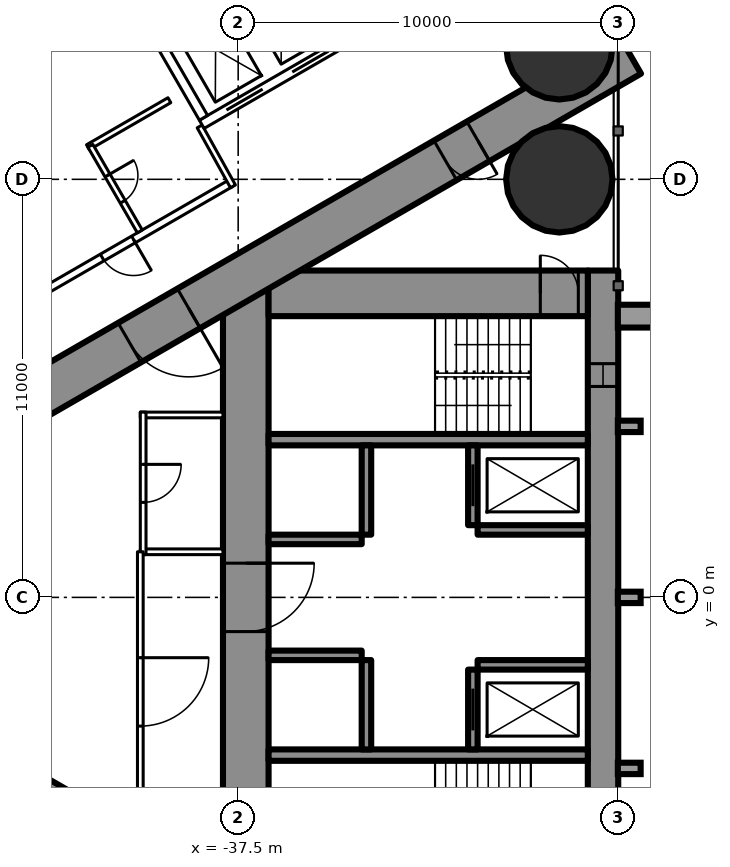
"""IFC4 building model, lengths in metres.
Left out: names, types, materials, properties, quantities, classifications, styles, units other than length and angle.
Written with IfcOpenShell. Run it as: python <this file> out.ifc"""

import sys

from ifc_helpers import new_model, si_unit, direction, frame, frame_2d, origin, origin_2d, place, context, subcontext, project, spatial, rectangle, hollow_circle, extrude, element, fill, save


model = new_model("IFC4")
c1 = context("Model", 3, precision=1e-05, world=origin(), true_north=direction((0.0, 1.0)))
c2 = subcontext(c1, "Body", "Model", "MODEL_VIEW")
j1 = project(units=[si_unit("LENGTHUNIT", "METRE"), si_unit("PLANEANGLEUNIT", "RADIAN")], contexts=[c1])
p1 = place(None, origin())
s1 = spatial("IfcSite", under=j1, at=p1, CompositionType="ELEMENT")
p2 = place(p1, origin())
s2 = spatial("IfcBuilding", under=s1, at=p2, CompositionType="ELEMENT")
p3 = place(p2, frame((0.0, 0.0, 42.5)))
s3 = spatial("IfcBuildingStorey", under=s2, at=p3, CompositionType="ELEMENT", Elevation=42.5)
for number, where, z_axis, x_axis in (
    (1, (-29.05, 11.0, 0.0), (0.0, 0.0, 1.0), (1.0, 0.0, 0.0)),
    (2, (-29.05, 14.5, 0.0), (0.0, 0.0, 1.0), (1.0, 0.0, 0.0)),
):
    element("IfcColumn", number, at=place(p3, frame(where, z_axis=z_axis, x_axis=x_axis)), inside=s3, PredefinedType="COLUMN", context=c2, shape_type="SweptSolid", body=[
        extrude(hollow_circle(Radius=1.4, WallThickness=0.12, at=origin_2d()), origin(), (0.0, 0.0, 1.0), 3.5),
    ])
p4 = place(p3, frame((-27.9, 8.6, 0.0), z_axis=(0.0, 0.0, 1.0), x_axis=(0.0, -1.0, 0.0)))
e3 = element("IfcWall", 3, at=p4, inside=s3, PredefinedType="SHEAR", context=c2, shape_type="SweptSolid", body=[
    extrude(rectangle(XDim=17.2, YDim=0.8, at=frame_2d((8.6, 0.0))), origin(), (0.0, 0.0, 1.0), 3.5),
])
p5 = place(p4, frame((2.45, 0.0, 0.6)))
e4 = element("IfcOpeningElement", 4, at=p5, cuts=e3, PredefinedType="OPENING", context=c2, shape_type="SweptSolid", body=[
    extrude(rectangle(XDim=0.6, YDim=2.1, at=frame_2d((0.3, 1.05))), frame((0.0, 0.41, 0.0), z_axis=(0.0, -1.0, 0.0), x_axis=(1.0, 0.0, 0.0)), (0.0, 0.0, 1.0), 0.82),
])
p6 = place(p4, frame((14.15, 0.0, 0.6)))
e5 = element("IfcOpeningElement", 5, at=p6, cuts=e3, PredefinedType="OPENING", context=c2, shape_type="SweptSolid", body=[
    extrude(rectangle(XDim=0.6, YDim=2.1, at=frame_2d((0.3, 1.05))), frame((0.0, 0.41, 0.0), z_axis=(0.0, -1.0, 0.0), x_axis=(1.0, 0.0, 0.0)), (0.0, 0.0, 1.0), 0.82),
])
p7 = place(p3, frame((-37.3, 8.6, 0.0), z_axis=(0.0, 0.0, 1.0), x_axis=(0.0, -1.0, 0.0)))
e6 = element("IfcWall", 6, at=p7, inside=s3, PredefinedType="SHEAR", context=c2, shape_type="SweptSolid", body=[
    extrude(rectangle(XDim=17.2, YDim=1.2, at=frame_2d((8.6, 0.0))), origin(), (0.0, 0.0, 1.0), 3.5),
])
p8 = place(p7, frame((7.7, 0.0, 0.0)))
e7 = element("IfcOpeningElement", 7, at=p8, cuts=e6, PredefinedType="OPENING", context=c2, shape_type="SweptSolid", body=[
    extrude(rectangle(XDim=1.8, YDim=2.2, at=frame_2d((0.9, 1.1))), frame((0.0, 0.61, 0.0), z_axis=(0.0, -1.0, 0.0), x_axis=(1.0, 0.0, 0.0)), (0.0, 0.0, 1.0), 1.22),
])
p9 = place(p3, frame((-28.3, 8.0, 0.0), z_axis=(0.0, 0.0, 1.0), x_axis=(-1.0, 0.0, 0.0)))
e8 = element("IfcWall", 8, at=p9, inside=s3, PredefinedType="SHEAR", context=c2, shape_type="SweptSolid", body=[
    extrude(rectangle(XDim=8.4, YDim=1.2, at=frame_2d((4.2, 0.0))), origin(), (0.0, 0.0, 1.0), 3.5),
])
p10 = place(p9, frame((0.25, 0.0, 0.0)))
e9 = element("IfcOpeningElement", 9, at=p10, cuts=e8, PredefinedType="OPENING", context=c2, shape_type="SweptSolid", body=[
    extrude(rectangle(XDim=1.0, YDim=2.2, at=frame_2d((0.5, 1.1))), frame((0.0, 0.61, 0.0), z_axis=(0.0, -1.0, 0.0), x_axis=(1.0, 0.0, 0.0)), (0.0, 0.0, 1.0), 1.22),
])
for number, where, z_axis, x_axis in (
    (10, (-28.3, 4.15, 0.0), (0.0, 0.0, 1.0), (-1.0, 0.0, 0.0)),
    (11, (-28.3, -4.15, 0.0), (0.0, 0.0, 1.0), (-1.0, 0.0, 0.0)),
):
    element("IfcWall", number, at=place(p3, frame(where, z_axis=z_axis, x_axis=x_axis)), inside=s3, PredefinedType="SHEAR", context=c2, shape_type="SweptSolid", body=[
        extrude(rectangle(XDim=8.4, YDim=0.3, at=frame_2d((4.2, 0.0))), origin(), (0.0, 0.0, 1.0), 3.5),
    ])
p11 = place(p3, frame((-31.325, 4.0, 0.0), z_axis=(0.0, 0.0, 1.0), x_axis=(0.0, -1.0, 0.0)))
e12 = element("IfcWall", 12, at=p11, inside=s3, PredefinedType="SHEAR", context=c2, shape_type="SweptSolid", body=[
    extrude(rectangle(XDim=2.1, YDim=0.25, at=frame_2d((1.05, 0.0))), origin(), (0.0, 0.0, 1.0), 3.5),
])
p12 = place(p11, frame((0.5, 0.0, 0.0)))
e13 = element("IfcOpeningElement", 13, at=p12, cuts=e12, PredefinedType="OPENING", context=c2, shape_type="SweptSolid", body=[
    extrude(rectangle(XDim=1.1, YDim=2.2, at=frame_2d((0.55, 1.1))), frame((0.0, 0.135, 0.0), z_axis=(0.0, -1.0, 0.0), x_axis=(1.0, 0.0, 0.0)), (0.0, 0.0, 1.0), 0.27),
])
p13 = place(p3, frame((-34.125, 4.0, 0.0), z_axis=(0.0, 0.0, 1.0), x_axis=(0.0, -1.0, 0.0)))
e14 = element("IfcWall", 14, at=p13, inside=s3, PredefinedType="SHEAR", context=c2, shape_type="SweptSolid", body=[
    extrude(rectangle(XDim=2.35, YDim=0.25, at=frame_2d((1.175, 0.0))), origin(), (0.0, 0.0, 1.0), 3.5),
])
p14 = place(p3, frame((-28.3, 1.775, 0.0), z_axis=(0.0, 0.0, 1.0), x_axis=(-1.0, 0.0, 0.0)))
e15 = element("IfcWall", 15, at=p14, inside=s3, PredefinedType="SHEAR", context=c2, shape_type="SweptSolid", body=[
    extrude(rectangle(XDim=2.9, YDim=0.25, at=frame_2d((1.45, 0.0))), origin(), (0.0, 0.0, 1.0), 3.5),
])
p15 = place(p3, frame((-34.25, 1.525, 0.0), z_axis=(0.0, 0.0, 1.0), x_axis=(-1.0, 0.0, 0.0)))
e16 = element("IfcWall", 16, at=p15, inside=s3, PredefinedType="SHEAR", context=c2, shape_type="SweptSolid", body=[
    extrude(rectangle(XDim=2.45, YDim=0.25, at=frame_2d((1.225, 0.0))), origin(), (0.0, 0.0, 1.0), 3.5),
])
p16 = place(p3, frame((-31.325, -1.9, 0.0), z_axis=(0.0, 0.0, 1.0), x_axis=(0.0, -1.0, 0.0)))
e17 = element("IfcWall", 17, at=p16, inside=s3, PredefinedType="SHEAR", context=c2, shape_type="SweptSolid", body=[
    extrude(rectangle(XDim=2.1, YDim=0.25, at=frame_2d((1.05, 0.0))), origin(), (0.0, 0.0, 1.0), 3.5),
])
p17 = place(p16, frame((0.5, 0.0, 0.0)))
e18 = element("IfcOpeningElement", 18, at=p17, cuts=e17, PredefinedType="OPENING", context=c2, shape_type="SweptSolid", body=[
    extrude(rectangle(XDim=1.1, YDim=2.2, at=frame_2d((0.55, 1.1))), frame((0.0, 0.135, 0.0), z_axis=(0.0, -1.0, 0.0), x_axis=(1.0, 0.0, 0.0)), (0.0, 0.0, 1.0), 0.27),
])
p18 = place(p3, frame((-34.125, -1.65, 0.0), z_axis=(0.0, 0.0, 1.0), x_axis=(0.0, -1.0, 0.0)))
e19 = element("IfcWall", 19, at=p18, inside=s3, PredefinedType="SHEAR", context=c2, shape_type="SweptSolid", body=[
    extrude(rectangle(XDim=2.35, YDim=0.25, at=frame_2d((1.175, 0.0))), origin(), (0.0, 0.0, 1.0), 3.5),
])
p19 = place(p3, frame((-28.3, -1.775, 0.0), z_axis=(0.0, 0.0, 1.0), x_axis=(-1.0, 0.0, 0.0)))
e20 = element("IfcWall", 20, at=p19, inside=s3, PredefinedType="SHEAR", context=c2, shape_type="SweptSolid", body=[
    extrude(rectangle(XDim=2.9, YDim=0.25, at=frame_2d((1.45, 0.0))), origin(), (0.0, 0.0, 1.0), 3.5),
])
p20 = place(p3, frame((-34.25, -1.525, 0.0), z_axis=(0.0, 0.0, 1.0), x_axis=(-1.0, 0.0, 0.0)))
e21 = element("IfcWall", 21, at=p20, inside=s3, PredefinedType="SHEAR", context=c2, shape_type="SweptSolid", body=[
    extrude(rectangle(XDim=2.45, YDim=0.25, at=frame_2d((1.225, 0.0))), origin(), (0.0, 0.0, 1.0), 3.5),
])
p21 = place(p3, frame((-27.2, 14.3, 0.0), z_axis=(0.0, 0.0, 1.0), x_axis=(-0.866026593062, -0.499997940104, 0.0)))
e22 = element("IfcWall", 22, at=p21, inside=s3, PredefinedType="SHEAR", context=c2, shape_type="SweptSolid", body=[
    extrude(rectangle(XDim=28.946, YDim=1.2, at=frame_2d((14.473, 0.0))), origin(), (0.0, 0.0, 1.0), 3.5),
])
p22 = place(p21, frame((4.6, 0.0, 0.0)))
e23 = element("IfcOpeningElement", 23, at=p22, cuts=e22, PredefinedType="OPENING", context=c2, shape_type="SweptSolid", body=[
    extrude(rectangle(XDim=1.0, YDim=2.2, at=frame_2d((0.5, 1.1))), frame((0.0, 0.61, 0.0), z_axis=(0.0, -1.0, 0.0), x_axis=(1.0, 0.0, 0.0)), (0.0, 0.0, 1.0), 1.22),
])
p23 = place(p21, frame((13.395, 0.0, 0.0)))
e24 = element("IfcOpeningElement", 24, at=p23, cuts=e22, PredefinedType="OPENING", context=c2, shape_type="SweptSolid", body=[
    extrude(rectangle(XDim=1.8, YDim=2.2, at=frame_2d((0.9, 1.1))), frame((0.0, 0.61, 0.0), z_axis=(0.0, -1.0, 0.0), x_axis=(1.0, 0.0, 0.0)), (0.0, 0.0, 1.0), 1.22),
])
p24 = place(p3, frame((-27.2, -14.3, 0.0), z_axis=(0.0, 0.0, 1.0), x_axis=(-0.866024021859, 0.500002393557, 0.0)))
e25 = element("IfcWall", 25, at=p24, inside=s3, PredefinedType="SHEAR", context=c2, shape_type="SweptSolid", body=[
    extrude(rectangle(XDim=27.907, YDim=1.2, at=frame_2d((13.954, 0.0))), origin(), (0.0, 0.0, 1.0), 3.5),
])
p25 = place(p24, frame((4.6, 0.0, 0.0)))
e26 = element("IfcOpeningElement", 26, at=p25, cuts=e25, PredefinedType="OPENING", context=c2, shape_type="SweptSolid", body=[
    extrude(rectangle(XDim=1.0, YDim=2.2, at=frame_2d((0.5, 1.1))), frame((0.0, 0.61, 0.0), z_axis=(0.0, -1.0, 0.0), x_axis=(1.0, 0.0, 0.0)), (0.0, 0.0, 1.0), 1.22),
])
p26 = place(p24, frame((13.395, 0.0, 0.0)))
e27 = element("IfcOpeningElement", 27, at=p26, cuts=e25, PredefinedType="OPENING", context=c2, shape_type="SweptSolid", body=[
    extrude(rectangle(XDim=1.8, YDim=2.2, at=frame_2d((0.9, 1.1))), frame((0.0, 0.61, 0.0), z_axis=(0.0, -1.0, 0.0), x_axis=(1.0, 0.0, 0.0)), (0.0, 0.0, 1.0), 1.22),
])
p27 = place(p3, frame((-37.7, 10.894, 0.0), z_axis=(0.0, 0.0, 1.0), x_axis=(-0.866027905338, -0.499995667157, 0.0)))
e28 = element("IfcWall", 28, at=p27, inside=s3, PredefinedType="PARTITIONING", context=c2, shape_type="SweptSolid", body=[
    extrude(rectangle(XDim=21.787, YDim=0.2, at=frame_2d((10.894, 0.0))), origin(), (0.0, 0.0, 1.0), 3.25),
])
p28 = place(p27, frame((11.78, 0.0, 0.0)))
e29 = element("IfcOpeningElement", 29, at=p28, cuts=e28, PredefinedType="OPENING", context=c2, shape_type="SweptSolid", body=[
    extrude(rectangle(XDim=0.95, YDim=2.2, at=frame_2d((0.475, 1.1))), frame((0.0, 0.11, 0.0), z_axis=(0.0, -1.0, 0.0), x_axis=(1.0, 0.0, 0.0)), (0.0, 0.0, 1.0), 0.22),
])
p29 = place(p27, frame((2.95, 0.0, 0.0)))
e30 = element("IfcOpeningElement", 30, at=p29, cuts=e28, PredefinedType="OPENING", context=c2, shape_type="SweptSolid", body=[
    extrude(rectangle(XDim=0.95, YDim=2.2, at=frame_2d((0.475, 1.1))), frame((0.0, 0.11, 0.0), z_axis=(0.0, -1.0, 0.0), x_axis=(1.0, 0.0, 0.0)), (0.0, 0.0, 1.0), 0.22),
])
p30 = place(p3, frame((-36.92, -11.344, 0.0), z_axis=(0.0, 0.0, 1.0), x_axis=(-0.866028313256, 0.499994960614, 0.0)))
e31 = element("IfcWall", 31, at=p30, inside=s3, PredefinedType="PARTITIONING", context=c2, shape_type="SweptSolid", body=[
    extrude(rectangle(XDim=22.568, YDim=0.2, at=frame_2d((11.284, 0.0))), origin(), (0.0, 0.0, 1.0), 3.25),
])
p31 = place(p30, frame((21.018, 0.0, 0.0)))
e32 = element("IfcOpeningElement", 32, at=p31, cuts=e31, PredefinedType="OPENING", context=c2, shape_type="SweptSolid", body=[
    extrude(rectangle(XDim=0.95, YDim=2.2, at=frame_2d((0.475, 1.1))), frame((0.0, 0.11, 0.0), z_axis=(0.0, -1.0, 0.0), x_axis=(1.0, 0.0, 0.0)), (0.0, 0.0, 1.0), 0.22),
])
p32 = place(p30, frame((3.35, 0.0, 0.0)))
e33 = element("IfcOpeningElement", 33, at=p32, cuts=e31, PredefinedType="OPENING", context=c2, shape_type="SweptSolid", body=[
    extrude(rectangle(XDim=1.0, YDim=2.2, at=frame_2d((0.5, 1.1))), frame((0.0, 0.11, 0.0), z_axis=(0.0, -1.0, 0.0), x_axis=(1.0, 0.0, 0.0)), (0.0, 0.0, 1.0), 0.22),
])
p33 = place(p3, frame((-38.513, 12.392, 0.0), z_axis=(0.0, 0.0, 1.0), x_axis=(0.485585508183, -0.874189175317, 0.0)))
e34 = element("IfcWall", 34, at=p33, inside=s3, PredefinedType="PARTITIONING", context=c2, shape_type="SweptSolid", body=[
    extrude(rectangle(XDim=1.805, YDim=0.15, at=frame_2d((0.902, 0.0))), origin(), (0.0, 0.0, 1.0), 3.25),
])
p34 = place(p3, frame((-39.31, 13.082, 0.0), z_axis=(0.0, 0.0, 1.0), x_axis=(-0.866031185235, -0.4999899861, 0.0)))
e35 = element("IfcWall", 35, at=p34, inside=s3, PredefinedType="PARTITIONING", context=c2, shape_type="SweptSolid", body=[
    extrude(rectangle(XDim=2.475, YDim=0.15, at=frame_2d((1.238, 0.0))), origin(), (0.0, 0.0, 1.0), 3.25),
])
p35 = place(p3, frame((-40.088, 9.63, 0.0), z_axis=(0.0, 0.0, 1.0), x_axis=(-0.500006934395, 0.866021400173, 0.0)))
e36 = element("IfcWall", 36, at=p35, inside=s3, PredefinedType="PARTITIONING", context=c2, shape_type="SweptSolid", body=[
    extrude(rectangle(XDim=2.6, YDim=0.15, at=frame_2d((1.3, 0.0))), origin(), (0.0, 0.0, 1.0), 3.25),
])
p36 = place(p35, frame((0.9, 0.0, 0.0)))
e37 = element("IfcOpeningElement", 37, at=p36, cuts=e36, PredefinedType="OPENING", context=c2, shape_type="SweptSolid", body=[
    extrude(rectangle(XDim=0.8, YDim=2.2, at=frame_2d((0.4, 1.1))), frame((0.0, 0.085, 0.0), z_axis=(0.0, -1.0, 0.0), x_axis=(1.0, 0.0, 0.0)), (0.0, 0.0, 1.0), 0.17),
])
for number, where, z_axis, x_axis in (
    (38, (-37.9, 1.2, 0.0), (0.0, 0.0, 1.0), (-1.0, 0.0, 0.0)),
    (39, (-37.9, 4.8, 0.0), (0.0, 0.0, 1.0), (-1.0, 0.0, 0.0)),
):
    element("IfcWall", number, at=place(p3, frame(where, z_axis=z_axis, x_axis=x_axis)), inside=s3, PredefinedType="PARTITIONING", context=c2, shape_type="SweptSolid", body=[
        extrude(rectangle(XDim=2.175, YDim=0.15, at=frame_2d((1.087, 0.0))), origin(), (0.0, 0.0, 1.0), 3.25),
    ])
p37 = place(p3, frame((-40.0, 4.875, 0.0), z_axis=(0.0, 0.0, 1.0), x_axis=(0.0, -1.0, 0.0)))
e40 = element("IfcWall", 40, at=p37, inside=s3, PredefinedType="PARTITIONING", context=c2, shape_type="SweptSolid", body=[
    extrude(rectangle(XDim=3.75, YDim=0.15, at=frame_2d((1.875, 0.0))), origin(), (0.0, 0.0, 1.0), 3.25),
])
p38 = place(p37, frame((1.375, 0.0, 0.0)))
e41 = element("IfcOpeningElement", 41, at=p38, cuts=e40, PredefinedType="OPENING", context=c2, shape_type="SweptSolid", body=[
    extrude(rectangle(XDim=1.0, YDim=2.2, at=frame_2d((0.5, 1.1))), frame((0.0, 0.085, 0.0), z_axis=(0.0, -1.0, 0.0), x_axis=(1.0, 0.0, 0.0)), (0.0, 0.0, 1.0), 0.17),
])
p39 = place(p3, frame((-40.075, 1.2, 0.0), z_axis=(0.0, 0.0, 1.0), x_axis=(0.0, -1.0, 0.0)))
e42 = element("IfcWall", 42, at=p39, inside=s3, PredefinedType="PARTITIONING", context=c2, shape_type="SweptSolid", body=[
    extrude(rectangle(XDim=7.374, YDim=0.15, at=frame_2d((3.687, 0.0))), origin(), (0.0, 0.0, 1.0), 3.25),
])
p40 = place(p39, frame((2.787, 0.0, 0.0)))
e43 = element("IfcOpeningElement", 43, at=p40, cuts=e42, PredefinedType="OPENING", context=c2, shape_type="SweptSolid", body=[
    extrude(rectangle(XDim=1.8, YDim=2.2, at=frame_2d((0.9, 1.1))), frame((0.0, 0.085, 0.0), z_axis=(0.0, -1.0, 0.0), x_axis=(1.0, 0.0, 0.0)), (0.0, 0.0, 1.0), 0.17),
])
p41 = place(p3, frame((-31.01, 16.747, 0.0), z_axis=(0.0, 0.0, 1.0), x_axis=(-0.866028165386, -0.499995216735, 0.0)))
e44 = element("IfcWall", 44, at=p41, inside=s3, PredefinedType="PARTITIONING", context=c2, shape_type="SweptSolid", body=[
    extrude(rectangle(XDim=8.6, YDim=0.25, at=frame_2d((4.3, 0.0))), origin(), (0.0, 0.0, 1.0), 3.25),
])
p42 = place(p41, frame((0.75, 0.0, 0.0)))
e45 = element("IfcOpeningElement", 45, at=p42, cuts=e44, PredefinedType="OPENING", context=c2, shape_type="SweptSolid", body=[
    extrude(rectangle(XDim=1.1, YDim=2.2, at=frame_2d((0.55, 1.1))), frame((0.0, 0.135, 0.0), z_axis=(0.0, -1.0, 0.0), x_axis=(1.0, 0.0, 0.0)), (0.0, 0.0, 1.0), 0.27),
])
p43 = place(p41, frame((2.75, 0.0, 0.0)))
e46 = element("IfcOpeningElement", 46, at=p43, cuts=e44, PredefinedType="OPENING", context=c2, shape_type="SweptSolid", body=[
    extrude(rectangle(XDim=1.1, YDim=2.2, at=frame_2d((0.55, 1.1))), frame((0.0, 0.135, 0.0), z_axis=(0.0, -1.0, 0.0), x_axis=(1.0, 0.0, 0.0)), (0.0, 0.0, 1.0), 0.27),
])
p44 = place(p41, frame((4.75, 0.0, 0.0)))
e47 = element("IfcOpeningElement", 47, at=p44, cuts=e44, PredefinedType="OPENING", context=c2, shape_type="SweptSolid", body=[
    extrude(rectangle(XDim=1.1, YDim=2.2, at=frame_2d((0.55, 1.1))), frame((0.0, 0.135, 0.0), z_axis=(0.0, -1.0, 0.0), x_axis=(1.0, 0.0, 0.0)), (0.0, 0.0, 1.0), 0.27),
])
p45 = place(p41, frame((6.75, 0.0, 0.0)))
e48 = element("IfcOpeningElement", 48, at=p45, cuts=e44, PredefinedType="OPENING", context=c2, shape_type="SweptSolid", body=[
    extrude(rectangle(XDim=1.1, YDim=2.2, at=frame_2d((0.55, 1.1))), frame((0.0, 0.135, 0.0), z_axis=(0.0, -1.0, 0.0), x_axis=(1.0, 0.0, 0.0)), (0.0, 0.0, 1.0), 0.27),
])
p46 = place(p3, frame((-38.413, 12.618, 0.0), z_axis=(0.0, 0.0, 1.0), x_axis=(-0.499872130319, 0.866099216793, 0.0)))
e49 = element("IfcWall", 49, at=p46, inside=s3, PredefinedType="PARTITIONING", context=c2, shape_type="SweptSolid", body=[
    extrude(rectangle(XDim=3.2, YDim=0.25, at=frame_2d((1.6, 0.0))), origin(), (0.0, 0.0, 1.0), 3.25),
])
p47 = place(p36, origin())
e50 = element("IfcDoor", 50, at=p47, inside=s3, OperationType="SINGLE_SWING_RIGHT", PredefinedType="DOOR", context=c2, shape_type="SweptSolid", body=[
    extrude(rectangle(XDim=0.8, YDim=2.2, at=frame_2d((0.4, 1.1))), frame((0.0, 0.025, 0.0), z_axis=(0.0, -1.0, 0.0), x_axis=(1.0, 0.0, 0.0)), (0.0, 0.0, 1.0), 0.05),
])
fill(e37, e50)
p48 = place(p29, origin())
e51 = element("IfcDoor", 51, at=p48, inside=s3, OperationType="SINGLE_SWING_LEFT", PredefinedType="DOOR", context=c2, shape_type="SweptSolid", body=[
    extrude(rectangle(XDim=0.95, YDim=2.2, at=frame_2d((0.475, 1.1))), frame((0.0, 0.025, 0.0), z_axis=(0.0, -1.0, 0.0), x_axis=(1.0, 0.0, 0.0)), (0.0, 0.0, 1.0), 0.05),
])
fill(e30, e51)
p49 = place(p38, origin())
e52 = element("IfcDoor", 52, at=p49, inside=s3, OperationType="SINGLE_SWING_LEFT", PredefinedType="DOOR", context=c2, shape_type="SweptSolid", body=[
    extrude(rectangle(XDim=1.0, YDim=2.2, at=frame_2d((0.5, 1.1))), frame((0.0, 0.025, 0.0), z_axis=(0.0, -1.0, 0.0), x_axis=(1.0, 0.0, 0.0)), (0.0, 0.0, 1.0), 0.05),
])
fill(e41, e52)
p50 = place(p40, origin())
e53 = element("IfcDoor", 53, at=p50, inside=s3, OperationType="DOUBLE_DOOR_SINGLE_SWING", PredefinedType="DOOR", context=c2, shape_type="SweptSolid", body=[
    extrude(rectangle(XDim=1.8, YDim=2.2, at=frame_2d((0.9, 1.1))), frame((0.0, 0.025, 0.0), z_axis=(0.0, -1.0, 0.0), x_axis=(1.0, 0.0, 0.0)), (0.0, 0.0, 1.0), 0.05),
])
fill(e43, e53)
p51 = place(p22, origin())
e54 = element("IfcDoor", 54, at=p51, inside=s3, OperationType="SINGLE_SWING_LEFT", PredefinedType="DOOR", context=c2, shape_type="SweptSolid", body=[
    extrude(rectangle(XDim=1.0, YDim=2.2, at=frame_2d((0.5, 1.1))), frame((0.0, 0.025, 0.0), z_axis=(0.0, -1.0, 0.0), x_axis=(1.0, 0.0, 0.0)), (0.0, 0.0, 1.0), 0.05),
])
fill(e23, e54)
p52 = place(p23, origin())
e55 = element("IfcDoor", 55, at=p52, inside=s3, OperationType="DOUBLE_DOOR_SINGLE_SWING", PredefinedType="DOOR", context=c2, shape_type="SweptSolid", body=[
    extrude(rectangle(XDim=1.8, YDim=2.2, at=frame_2d((0.9, 1.1))), frame((0.0, 0.025, 0.0), z_axis=(0.0, -1.0, 0.0), x_axis=(1.0, 0.0, 0.0)), (0.0, 0.0, 1.0), 0.05),
])
fill(e24, e55)
p53 = place(p8, origin())
e56 = element("IfcDoor", 56, at=p53, inside=s3, OperationType="DOUBLE_DOOR_SINGLE_SWING", PredefinedType="DOOR", context=c2, shape_type="SweptSolid", body=[
    extrude(rectangle(XDim=1.8, YDim=2.2, at=frame_2d((0.9, 1.1))), frame((0.0, 0.025, 0.0), z_axis=(0.0, -1.0, 0.0), x_axis=(1.0, 0.0, 0.0)), (0.0, 0.0, 1.0), 0.05),
])
fill(e7, e56)
p54 = place(p10, origin())
e57 = element("IfcDoor", 57, at=p54, inside=s3, OperationType="SINGLE_SWING_RIGHT", PredefinedType="DOOR", context=c2, shape_type="SweptSolid", body=[
    extrude(rectangle(XDim=1.0, YDim=2.2, at=frame_2d((0.5, 1.1))), frame((0.0, 0.025, 0.0), z_axis=(0.0, -1.0, 0.0), x_axis=(1.0, 0.0, 0.0)), (0.0, 0.0, 1.0), 0.05),
])
fill(e9, e57)
p55 = place(p12, origin())
e58 = element("IfcDoor", 58, at=p55, inside=s3, OperationType="SLIDING_TO_LEFT", PredefinedType="USERDEFINED", context=c2, shape_type="SweptSolid", body=[
    extrude(rectangle(XDim=1.1, YDim=2.2, at=frame_2d((0.55, 1.1))), frame((0.0, 0.025, 0.0), z_axis=(0.0, -1.0, 0.0), x_axis=(1.0, 0.0, 0.0)), (0.0, 0.0, 1.0), 0.05),
])
fill(e13, e58)
p56 = place(p17, origin())
e59 = element("IfcDoor", 59, at=p56, inside=s3, OperationType="SLIDING_TO_LEFT", PredefinedType="USERDEFINED", context=c2, shape_type="SweptSolid", body=[
    extrude(rectangle(XDim=1.1, YDim=2.2, at=frame_2d((0.55, 1.1))), frame((0.0, 0.025, 0.0), z_axis=(0.0, -1.0, 0.0), x_axis=(1.0, 0.0, 0.0)), (0.0, 0.0, 1.0), 0.05),
])
fill(e18, e59)
p57 = place(p44, origin())
e60 = element("IfcDoor", 60, at=p57, inside=s3, OperationType="DOUBLE_DOOR_SLIDING", PredefinedType="USERDEFINED", context=c2, shape_type="SweptSolid", body=[
    extrude(rectangle(XDim=1.1, YDim=2.2, at=frame_2d((0.55, 1.1))), frame((0.0, 0.025, 0.0), z_axis=(0.0, -1.0, 0.0), x_axis=(1.0, 0.0, 0.0)), (0.0, 0.0, 1.0), 0.05),
])
fill(e47, e60)
p58 = place(p45, origin())
e61 = element("IfcDoor", 61, at=p58, inside=s3, OperationType="DOUBLE_DOOR_SLIDING", PredefinedType="USERDEFINED", context=c2, shape_type="SweptSolid", body=[
    extrude(rectangle(XDim=1.1, YDim=2.2, at=frame_2d((0.55, 1.1))), frame((0.0, 0.025, 0.0), z_axis=(0.0, -1.0, 0.0), x_axis=(1.0, 0.0, 0.0)), (0.0, 0.0, 1.0), 0.05),
])
fill(e48, e61)
p59 = place(p5, origin())
e62 = element("IfcWindow", 62, at=p59, inside=s3, PartitioningType="SINGLE_PANEL", PredefinedType="WINDOW", context=c2, shape_type="SweptSolid", body=[
    extrude(rectangle(XDim=0.6, YDim=2.1, at=frame_2d((0.3, 1.05))), frame((0.0, 0.03, 0.0), z_axis=(0.0, -1.0, 0.0), x_axis=(1.0, 0.0, 0.0)), (0.0, 0.0, 1.0), 0.06),
])
fill(e4, e62)
save(model, sys.argv[1])
